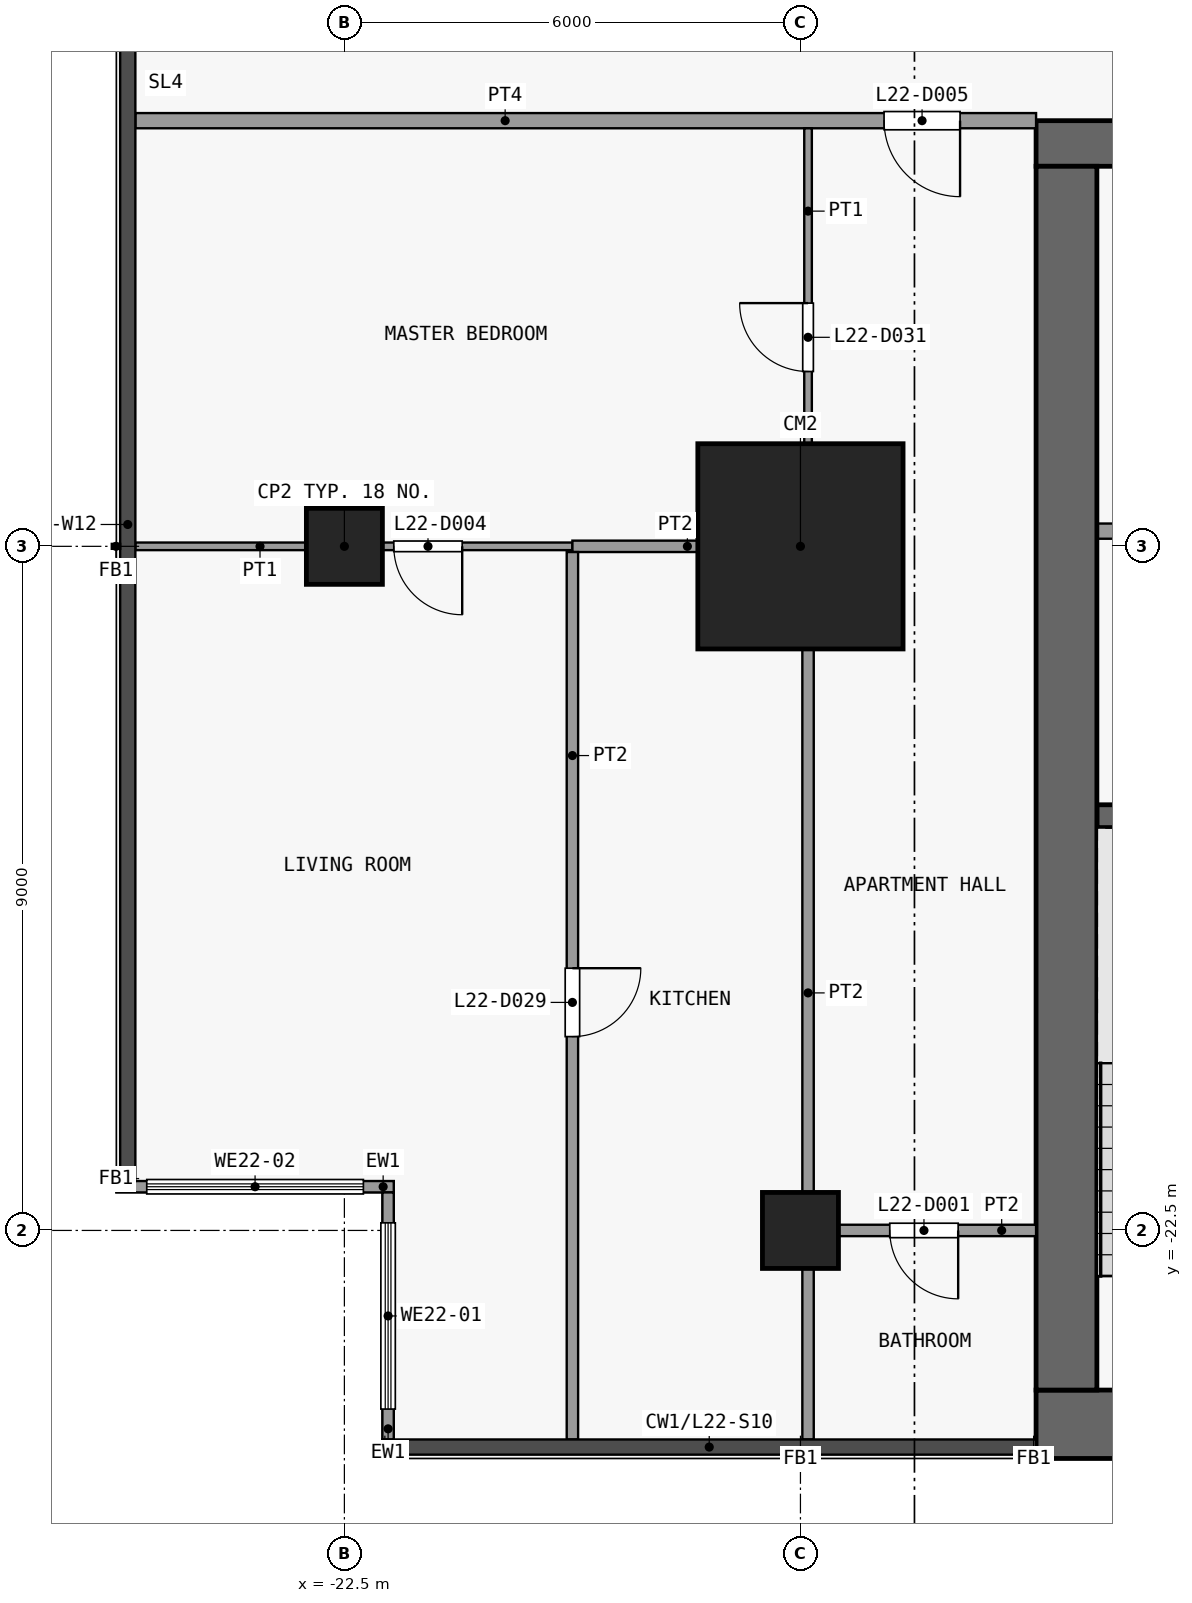
"""IFC4 building model, lengths in metres.
Left out: names, types, materials, properties, quantities, classifications, styles, units other than length and angle.
Written with IfcOpenShell. Run it as: python <this file> out.ifc"""

import sys

from ifc_helpers import new_model, si_unit, direction, frame, frame_2d, origin, origin_2d, place, context, subcontext, project, spatial, rectangle, extrude, element, fill, save


model = new_model("IFC4")
c1 = context("Model", 3, precision=1e-05, world=origin(), true_north=direction((0.0, 1.0)))
c2 = subcontext(c1, "Body", "Model", "MODEL_VIEW")
j1 = project(units=[si_unit("LENGTHUNIT", "METRE"), si_unit("PLANEANGLEUNIT", "RADIAN")], contexts=[c1])
p1 = place(None, origin())
s1 = spatial("IfcSite", under=j1, at=p1, CompositionType="ELEMENT")
p2 = place(p1, origin())
s2 = spatial("IfcBuilding", under=s1, at=p2, CompositionType="ELEMENT")
p3 = place(p2, frame((0.0, 0.0, 91.9)))
s3 = spatial("IfcBuildingStorey", under=s2, at=p3, CompositionType="ELEMENT", Elevation=91.9)
for number, where, z_axis, x_axis in (
    (1, (-22.5, -13.5, 0.0), (0.0, 0.0, 1.0), (1.0, 0.0, 0.0)),
    (2, (-16.5, -22.5, 0.0), (0.0, 0.0, 1.0), (1.0, 0.0, 0.0)),
):
    element("IfcColumn", number, at=place(p3, frame(where, z_axis=z_axis, x_axis=x_axis)), inside=s3, PredefinedType="COLUMN", context=c2, shape_type="SweptSolid", body=[
        extrude(rectangle(XDim=1.0, YDim=1.0, at=origin_2d()), origin(), (0.0, 0.0, 1.0), 3.6),
    ])
p4 = place(p3, frame((-16.5, -13.5, 0.0), z_axis=(0.0, 0.0, 1.0), x_axis=(1.0, 0.0, 0.0)))
e3 = element("IfcColumn", 3, at=p4, inside=s3, PredefinedType="COLUMN", context=c2, shape_type="SweptSolid", body=[
    extrude(rectangle(XDim=2.7, YDim=2.7, at=origin_2d()), origin(), (0.0, 0.0, 1.0), 3.6),
])
p5 = place(p3, frame((-13.4, -25.05, 0.0), z_axis=(0.0, 0.0, 1.0), x_axis=(1.0, 0.0, 0.0)))
e4 = element("IfcWall", 4, at=p5, inside=s3, PredefinedType="SHEAR", context=c2, shape_type="SweptSolid", body=[
    extrude(rectangle(XDim=26.8, YDim=0.9, at=frame_2d((13.4, 0.0))), origin(), (0.0, 0.0, 1.0), 3.3),
])
p6 = place(p3, frame((-13.4, -8.2, 0.0), z_axis=(0.0, 0.0, 1.0), x_axis=(1.0, 0.0, 0.0)))
e5 = element("IfcWall", 5, at=p6, inside=s3, PredefinedType="SHEAR", context=c2, shape_type="SweptSolid", body=[
    extrude(rectangle(XDim=26.8, YDim=0.6, at=frame_2d((13.4, 0.0))), origin(), (0.0, 0.0, 1.0), 3.3),
])
p7 = place(p6, frame((7.7, 0.0, 0.0)))
e6 = element("IfcOpeningElement", 6, at=p7, cuts=e5, PredefinedType="OPENING", context=c2, shape_type="SweptSolid", body=[
    extrude(rectangle(XDim=1.8, YDim=2.1, at=frame_2d((0.9, 1.05))), frame((0.0, 0.31, 0.0), z_axis=(0.0, -1.0, 0.0), x_axis=(1.0, 0.0, 0.0)), (0.0, 0.0, 1.0), 0.62),
])
p8 = place(p6, frame((17.3, 0.0, 0.0)))
e7 = element("IfcOpeningElement", 7, at=p8, cuts=e5, PredefinedType="OPENING", context=c2, shape_type="SweptSolid", body=[
    extrude(rectangle(XDim=1.8, YDim=2.1, at=frame_2d((0.9, 1.05))), frame((0.0, 0.31, 0.0), z_axis=(0.0, -1.0, 0.0), x_axis=(1.0, 0.0, 0.0)), (0.0, 0.0, 1.0), 0.62),
])
p9 = place(p6, frame((2.625, 0.0, 0.0)))
e8 = element("IfcOpeningElement", 8, at=p9, cuts=e5, PredefinedType="OPENING", context=c2, shape_type="SweptSolid", body=[
    extrude(rectangle(XDim=0.9, YDim=2.1, at=frame_2d((0.45, 1.05))), frame((0.0, 0.31, 0.0), z_axis=(0.0, -1.0, 0.0), x_axis=(1.0, 0.0, 0.0)), (0.0, 0.0, 1.0), 0.62),
])
p10 = place(p6, frame((23.275, 0.0, 0.0)))
e9 = element("IfcOpeningElement", 9, at=p10, cuts=e5, PredefinedType="OPENING", context=c2, shape_type="SweptSolid", body=[
    extrude(rectangle(XDim=0.9, YDim=2.1, at=frame_2d((0.45, 1.05))), frame((0.0, 0.31, 0.0), z_axis=(0.0, -1.0, 0.0), x_axis=(1.0, 0.0, 0.0)), (0.0, 0.0, 1.0), 0.62),
])
p11 = place(p3, frame((-13.0, -24.6, 0.0), z_axis=(0.0, 0.0, 1.0), x_axis=(0.0, 1.0, 0.0)))
e10 = element("IfcWall", 10, at=p11, inside=s3, PredefinedType="SHEAR", context=c2, shape_type="SweptSolid", body=[
    extrude(rectangle(XDim=16.1, YDim=0.8, at=frame_2d((8.05, 0.0))), origin(), (0.0, 0.0, 1.0), 3.3),
])
p12 = place(p3, frame((-12.6, -17.05, 0.0), z_axis=(0.0, 0.0, 1.0), x_axis=(1.0, 0.0, 0.0)))
e11 = element("IfcWall", 11, at=p12, inside=s3, PredefinedType="SHEAR", context=c2, shape_type="SweptSolid", body=[
    extrude(rectangle(XDim=2.85, YDim=0.3, at=frame_2d((1.425, 0.0))), origin(), (0.0, 0.0, 1.0), 3.3),
])
p13 = place(p3, frame((-12.6, -13.3, 0.0), z_axis=(0.0, 0.0, 1.0), x_axis=(1.0, 0.0, 0.0)))
e12 = element("IfcWall", 12, at=p13, inside=s3, PredefinedType="PARTITIONING", context=c2, shape_type="SweptSolid", body=[
    extrude(rectangle(XDim=1.45, YDim=0.2, at=frame_2d((0.725, 0.0))), origin(), (0.0, 0.0, 1.0), 3.3),
])
p14 = place(p3, frame((-21.925, -25.25, 0.0), z_axis=(0.0, 0.0, 1.0), x_axis=(0.0, 1.0, 0.0)))
e13 = element("IfcWall", 13, at=p14, inside=s3, PredefinedType="SOLIDWALL", context=c2, shape_type="SweptSolid", body=[
    extrude(rectangle(XDim=3.25, YDim=0.15, at=frame_2d((1.625, 0.0))), origin(), (0.0, 0.0, 1.0), 3.3),
])
p15 = place(p14, frame((0.4, 0.0, 0.9)))
e14 = element("IfcOpeningElement", 14, at=p15, cuts=e13, PredefinedType="OPENING", context=c2, shape_type="SweptSolid", body=[
    extrude(rectangle(XDim=2.45, YDim=2.4, at=frame_2d((1.225, 1.2))), frame((0.0, 0.085, 0.0), z_axis=(0.0, -1.0, 0.0), x_axis=(1.0, 0.0, 0.0)), (0.0, 0.0, 1.0), 0.17),
])
p16 = place(p3, frame((-21.85, -21.925, 0.0), z_axis=(0.0, 0.0, 1.0), x_axis=(-1.0, 0.0, 0.0)))
e15 = element("IfcWall", 15, at=p16, inside=s3, PredefinedType="SOLIDWALL", context=c2, shape_type="SweptSolid", body=[
    extrude(rectangle(XDim=3.65, YDim=0.15, at=frame_2d((1.825, 0.0))), origin(), (0.0, 0.0, 1.0), 3.3),
])
p17 = place(p16, frame((0.4, 0.0, 0.9)))
e16 = element("IfcOpeningElement", 16, at=p17, cuts=e15, PredefinedType="OPENING", context=c2, shape_type="SweptSolid", body=[
    extrude(rectangle(XDim=2.85, YDim=2.4, at=frame_2d((1.425, 1.2))), frame((0.0, 0.085, 0.0), z_axis=(0.0, -1.0, 0.0), x_axis=(1.0, 0.0, 0.0)), (0.0, 0.0, 1.0), 0.17),
])
p18 = place(p3, frame((-16.325, -22.5, 0.0), z_axis=(0.0, 0.0, 1.0), x_axis=(1.0, 0.0, 0.0)))
e17 = element("IfcWall", 17, at=p18, inside=s3, PredefinedType="PARTITIONING", context=c2, shape_type="SweptSolid", body=[
    extrude(rectangle(XDim=2.925, YDim=0.15, at=frame_2d((1.462, 0.0))), origin(), (0.0, 0.0, 1.0), 3.3),
])
p19 = place(p18, frame((1.0, 0.0, 0.0)))
e18 = element("IfcOpeningElement", 18, at=p19, cuts=e17, PredefinedType="OPENING", context=c2, shape_type="SweptSolid", body=[
    extrude(rectangle(XDim=0.9, YDim=2.1, at=frame_2d((0.45, 1.05))), frame((0.0, 0.085, 0.0), z_axis=(0.0, -1.0, 0.0), x_axis=(1.0, 0.0, 0.0)), (0.0, 0.0, 1.0), 0.17),
])
p20 = place(p3, frame((-25.25, -13.5, 0.0), z_axis=(0.0, 0.0, 1.0), x_axis=(1.0, 0.0, 0.0)))
e19 = element("IfcWall", 19, at=p20, inside=s3, PredefinedType="PARTITIONING", context=c2, shape_type="SweptSolid", body=[
    extrude(rectangle(XDim=5.75, YDim=0.1, at=frame_2d((2.875, 0.0))), origin(), (0.0, 0.0, 1.0), 3.3),
])
p21 = place(p20, frame((3.4, 0.0, 0.0)))
e20 = element("IfcOpeningElement", 20, at=p21, cuts=e19, PredefinedType="OPENING", context=c2, shape_type="SweptSolid", body=[
    extrude(rectangle(XDim=0.9, YDim=2.1, at=frame_2d((0.45, 1.05))), frame((0.0, 0.06, 0.0), z_axis=(0.0, -1.0, 0.0), x_axis=(1.0, 0.0, 0.0)), (0.0, 0.0, 1.0), 0.12),
])
p22 = place(p3, frame((-19.5, -13.5, 0.0), z_axis=(0.0, 0.0, 1.0), x_axis=(1.0, 0.0, 0.0)))
e21 = element("IfcWall", 21, at=p22, inside=s3, PredefinedType="PARTITIONING", context=c2, shape_type="SweptSolid", body=[
    extrude(rectangle(XDim=3.025, YDim=0.15, at=frame_2d((1.512, 0.0))), origin(), (0.0, 0.0, 1.0), 3.3),
])
p23 = place(p3, frame((-25.25, -7.9, 0.0), z_axis=(0.0, 0.0, 1.0), x_axis=(1.0, 0.0, 0.0)))
e22 = element("IfcWall", 22, at=p23, inside=s3, PredefinedType="PARTITIONING", context=c2, shape_type="SweptSolid", body=[
    extrude(rectangle(XDim=11.85, YDim=0.2, at=frame_2d((5.925, 0.0))), origin(), (0.0, 0.0, 1.0), 3.3),
])
p24 = place(p23, frame((9.85, 0.0, 0.0)))
e23 = element("IfcOpeningElement", 23, at=p24, cuts=e22, PredefinedType="OPENING", context=c2, shape_type="SweptSolid", body=[
    extrude(rectangle(XDim=1.0, YDim=2.1, at=frame_2d((0.5, 1.05))), frame((0.0, 0.11, 0.0), z_axis=(0.0, -1.0, 0.0), x_axis=(1.0, 0.0, 0.0)), (0.0, 0.0, 1.0), 0.22),
])
p25 = place(p3, frame((-19.5, -25.25, 0.0), z_axis=(0.0, 0.0, 1.0), x_axis=(0.0, 1.0, 0.0)))
e24 = element("IfcWall", 24, at=p25, inside=s3, PredefinedType="PARTITIONING", context=c2, shape_type="SweptSolid", body=[
    extrude(rectangle(XDim=11.675, YDim=0.15, at=frame_2d((5.837, 0.0))), origin(), (0.0, 0.0, 1.0), 3.3),
])
p26 = place(p25, frame((5.3, 0.0, 0.0)))
e25 = element("IfcOpeningElement", 25, at=p26, cuts=e24, PredefinedType="OPENING", context=c2, shape_type="SweptSolid", body=[
    extrude(rectangle(XDim=0.9, YDim=2.1, at=frame_2d((0.45, 1.05))), frame((0.0, 0.085, 0.0), z_axis=(0.0, -1.0, 0.0), x_axis=(1.0, 0.0, 0.0)), (0.0, 0.0, 1.0), 0.17),
])
p27 = place(p3, frame((-16.4, -13.5, 0.0), z_axis=(0.0, 0.0, 1.0), x_axis=(0.0, 1.0, 0.0)))
e26 = element("IfcWall", 26, at=p27, inside=s3, PredefinedType="PARTITIONING", context=c2, shape_type="SweptSolid", body=[
    extrude(rectangle(XDim=5.5, YDim=0.1, at=frame_2d((2.75, 0.0))), origin(), (0.0, 0.0, 1.0), 3.3),
])
p28 = place(p27, frame((2.3, 0.0, 0.0)))
e27 = element("IfcOpeningElement", 27, at=p28, cuts=e26, PredefinedType="OPENING", context=c2, shape_type="SweptSolid", body=[
    extrude(rectangle(XDim=0.9, YDim=2.1, at=frame_2d((0.45, 1.05))), frame((0.0, 0.06, 0.0), z_axis=(0.0, -1.0, 0.0), x_axis=(1.0, 0.0, 0.0)), (0.0, 0.0, 1.0), 0.12),
])
p29 = place(p3, frame((-16.4, -25.25, 0.0), z_axis=(0.0, 0.0, 1.0), x_axis=(0.0, 1.0, 0.0)))
e28 = element("IfcWall", 28, at=p29, inside=s3, PredefinedType="PARTITIONING", context=c2, shape_type="SweptSolid", body=[
    extrude(rectangle(XDim=11.75, YDim=0.15, at=frame_2d((5.875, 0.0))), origin(), (0.0, 0.0, 1.0), 3.3),
])
p30 = place(p15, origin())
e29 = element("IfcWindow", 29, at=p30, inside=s3, PartitioningType="SINGLE_PANEL", PredefinedType="WINDOW", context=c2, shape_type="SweptSolid", body=[
    extrude(rectangle(XDim=2.45, YDim=2.4, at=frame_2d((1.225, 1.2))), frame((0.0, 0.03, 0.0), z_axis=(0.0, -1.0, 0.0), x_axis=(1.0, 0.0, 0.0)), (0.0, 0.0, 1.0), 0.06),
])
fill(e14, e29)
p31 = place(p17, origin())
e30 = element("IfcWindow", 30, at=p31, inside=s3, PartitioningType="SINGLE_PANEL", PredefinedType="WINDOW", context=c2, shape_type="SweptSolid", body=[
    extrude(rectangle(XDim=2.85, YDim=2.4, at=frame_2d((1.425, 1.2))), frame((0.0, 0.03, 0.0), z_axis=(0.0, -1.0, 0.0), x_axis=(1.0, 0.0, 0.0)), (0.0, 0.0, 1.0), 0.06),
])
fill(e16, e30)
p32 = place(p19, origin())
e31 = element("IfcDoor", 31, at=p32, inside=s3, OperationType="SINGLE_SWING_RIGHT", PredefinedType="DOOR", context=c2, shape_type="SweptSolid", body=[
    extrude(rectangle(XDim=0.9, YDim=2.1, at=frame_2d((0.45, 1.05))), frame((0.0, 0.025, 0.0), z_axis=(0.0, -1.0, 0.0), x_axis=(1.0, 0.0, 0.0)), (0.0, 0.0, 1.0), 0.05),
])
fill(e18, e31)
p33 = place(p21, origin())
e32 = element("IfcDoor", 32, at=p33, inside=s3, OperationType="SINGLE_SWING_RIGHT", PredefinedType="DOOR", context=c2, shape_type="SweptSolid", body=[
    extrude(rectangle(XDim=0.9, YDim=2.1, at=frame_2d((0.45, 1.05))), frame((0.0, 0.025, 0.0), z_axis=(0.0, -1.0, 0.0), x_axis=(1.0, 0.0, 0.0)), (0.0, 0.0, 1.0), 0.05),
])
fill(e20, e32)
p34 = place(p24, origin())
e33 = element("IfcDoor", 33, at=p34, inside=s3, OperationType="SINGLE_SWING_RIGHT", PredefinedType="DOOR", context=c2, shape_type="SweptSolid", body=[
    extrude(rectangle(XDim=1.0, YDim=2.1, at=frame_2d((0.5, 1.05))), frame((0.0, 0.025, 0.0), z_axis=(0.0, -1.0, 0.0), x_axis=(1.0, 0.0, 0.0)), (0.0, 0.0, 1.0), 0.05),
])
fill(e23, e33)
p35 = place(p26, origin())
e34 = element("IfcDoor", 34, at=p35, inside=s3, OperationType="SINGLE_SWING_RIGHT", PredefinedType="DOOR", context=c2, shape_type="SweptSolid", body=[
    extrude(rectangle(XDim=0.9, YDim=2.1, at=frame_2d((0.45, 1.05))), frame((0.0, 0.025, 0.0), z_axis=(0.0, -1.0, 0.0), x_axis=(1.0, 0.0, 0.0)), (0.0, 0.0, 1.0), 0.05),
])
fill(e25, e34)
p36 = place(p28, origin())
e35 = element("IfcDoor", 35, at=p36, inside=s3, OperationType="SINGLE_SWING_LEFT", PredefinedType="DOOR", context=c2, shape_type="SweptSolid", body=[
    extrude(rectangle(XDim=0.9, YDim=2.1, at=frame_2d((0.45, 1.05))), frame((0.0, 0.025, 0.0), z_axis=(0.0, -1.0, 0.0), x_axis=(1.0, 0.0, 0.0)), (0.0, 0.0, 1.0), 0.05),
])
fill(e27, e35)
save(model, sys.argv[1])
